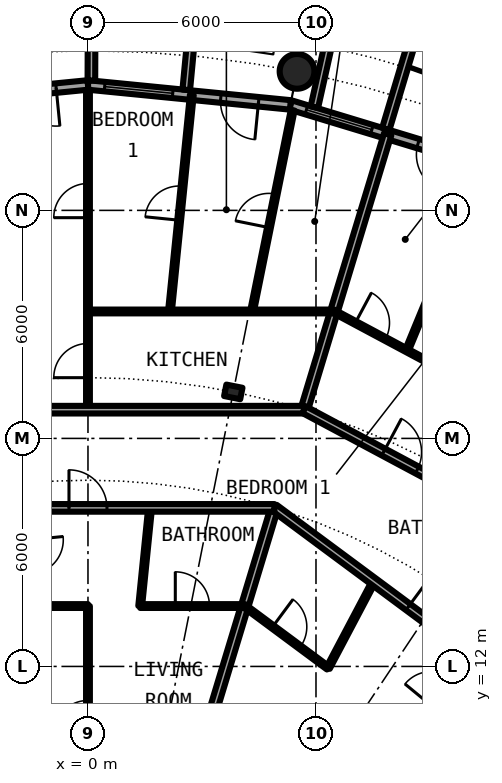
"""IFC4 building model, lengths in metres.
Left out: names, types, materials, properties, quantities, classifications, styles, units other than length and angle.
Written with IfcOpenShell. Run it as: python <this file> out.ifc"""

import sys

from ifc_helpers import new_model, si_unit, direction, frame, frame_2d, origin, origin_2d, place, context, subcontext, project, spatial, rectangle, hollow_circle, i_section, extrude, element, fill, save


model = new_model("IFC4")
c1 = context("Model", 3, precision=1e-05, world=origin(), true_north=direction((0.0, 1.0)))
c2 = subcontext(c1, "Body", "Model", "MODEL_VIEW")
j1 = project(units=[si_unit("LENGTHUNIT", "METRE"), si_unit("PLANEANGLEUNIT", "RADIAN")], contexts=[c1])
p1 = place(None, origin())
s1 = spatial("IfcSite", under=j1, at=p1, CompositionType="ELEMENT")
p2 = place(p1, origin())
s2 = spatial("IfcBuilding", under=s1, at=p2, CompositionType="ELEMENT")
p3 = place(p2, frame((0.0, 0.0, 120.8)))
s3 = spatial("IfcBuildingStorey", under=s2, at=p3, CompositionType="ELEMENT", Elevation=120.8)
p4 = place(p3, frame((5.501, 27.658, 0.0), z_axis=(0.0, 0.0, 1.0), x_axis=(1.0, 0.0, 0.0)))
e1 = element("IfcColumn", 1, at=p4, inside=s3, PredefinedType="COLUMN", context=c2, shape_type="SweptSolid", body=[
    extrude(hollow_circle(Radius=0.457, WallThickness=0.04, at=origin_2d()), origin(), (0.0, 0.0, 1.0), 3.05),
])
p5 = place(p3, frame((3.824, 19.223, 0.0), z_axis=(0.0, 0.0, 1.0), x_axis=(0.195090322016, 0.980785280403, 0.0)))
e2 = element("IfcColumn", 2, at=p5, inside=s3, PredefinedType="COLUMN", context=c2, shape_type="SweptSolid", body=[
    extrude(i_section(OverallWidth=0.307, OverallDepth=0.432, WebThickness=0.021, FlangeThickness=0.04, FilletRadius=0.027, at=origin_2d()), origin(), (0.0, 0.0, 1.0), 3.05),
])
p6 = place(p3, frame((10.447, 25.222, 0.0), z_axis=(0.0, 0.0, 1.0), x_axis=(-0.956965678721, 0.290201119486, 0.0)))
e3 = element("IfcWall", 3, at=p6, inside=s3, PredefinedType="SOLIDWALL", context=c2, shape_type="SweptSolid", body=[
    extrude(rectangle(XDim=5.351, YDim=0.25, at=frame_2d((2.676, 0.0))), origin(), (0.0, 0.0, 1.0), 2.7),
])
p7 = place(p6, frame((0.841, 0.0, 0.0)))
e4 = element("IfcOpeningElement", 4, at=p7, cuts=e3, PredefinedType="OPENING", context=c2, shape_type="SweptSolid", body=[
    extrude(rectangle(XDim=1.0, YDim=2.2, at=frame_2d((0.5, 1.1))), frame((0.0, 0.135, 0.0), z_axis=(0.0, -1.0, 0.0), x_axis=(1.0, 0.0, 0.0)), (0.0, 0.0, 1.0), 0.27),
])
p8 = place(p6, frame((3.111, 0.0, 0.3)))
e5 = element("IfcOpeningElement", 5, at=p8, cuts=e3, PredefinedType="OPENING", context=c2, shape_type="SweptSolid", body=[
    extrude(rectangle(XDim=1.8, YDim=2.1, at=frame_2d((0.9, 1.05))), frame((0.0, 0.135, 0.0), z_axis=(0.0, -1.0, 0.0), x_axis=(1.0, 0.0, 0.0)), (0.0, 0.0, 1.0), 0.27),
])
p9 = place(p3, frame((7.837, 26.144, -0.03), z_axis=(0.0, 0.0, 1.0), x_axis=(0.287064767992, 0.957911174889, 0.0)))
e6 = element("IfcWall", 6, at=p9, inside=s3, PredefinedType="SOLIDWALL", context=c2, shape_type="SweptSolid", body=[
    extrude(rectangle(XDim=3.006, YDim=0.2, at=frame_2d((1.503, 0.0))), origin(), (0.0, 0.0, 1.0), 2.73),
])
p10 = place(p3, frame((5.957, 26.715, -0.03), z_axis=(0.0, 0.0, 1.0), x_axis=(0.217857287091, 0.975980636315, 0.0)))
e7 = element("IfcWall", 7, at=p10, inside=s3, PredefinedType="SOLIDWALL", context=c2, shape_type="SweptSolid", body=[
    extrude(rectangle(XDim=2.928, YDim=0.2, at=frame_2d((1.464, 0.0))), origin(), (0.0, 0.0, 1.0), 2.73),
])
p11 = place(p3, frame((5.326, 26.775, 0.0), z_axis=(0.0, 0.0, 1.0), x_axis=(-0.995173996315, 0.098126026407, 0.0)))
e8 = element("IfcWall", 8, at=p11, inside=s3, PredefinedType="SOLIDWALL", context=c2, shape_type="SweptSolid", body=[
    extrude(rectangle(XDim=5.352, YDim=0.25, at=frame_2d((2.676, 0.0))), origin(), (0.0, 0.0, 1.0), 2.7),
])
p12 = place(p11, frame((0.841, 0.0, 0.0)))
e9 = element("IfcOpeningElement", 9, at=p12, cuts=e8, PredefinedType="OPENING", context=c2, shape_type="SweptSolid", body=[
    extrude(rectangle(XDim=1.0, YDim=2.2, at=frame_2d((0.5, 1.1))), frame((0.0, 0.135, 0.0), z_axis=(0.0, -1.0, 0.0), x_axis=(1.0, 0.0, 0.0)), (0.0, 0.0, 1.0), 0.27),
])
p13 = place(p11, frame((3.111, 0.0, 0.3)))
e10 = element("IfcOpeningElement", 10, at=p13, cuts=e8, PredefinedType="OPENING", context=c2, shape_type="SweptSolid", body=[
    extrude(rectangle(XDim=1.8, YDim=2.1, at=frame_2d((0.9, 1.05))), frame((0.0, 0.135, 0.0), z_axis=(0.0, -1.0, 0.0), x_axis=(1.0, 0.0, 0.0)), (0.0, 0.0, 1.0), 0.27),
])
p14 = place(p3, frame((2.586, 27.171, -0.03), z_axis=(0.0, 0.0, 1.0), x_axis=(0.094548432284, 0.995520262954, 0.0)))
e11 = element("IfcWall", 11, at=p14, inside=s3, PredefinedType="SOLIDWALL", context=c2, shape_type="SweptSolid", body=[
    extrude(rectangle(XDim=3.006, YDim=0.2, at=frame_2d((1.503, 0.0))), origin(), (0.0, 0.0, 1.0), 2.73),
])
p15 = place(p3, frame((0.09, 27.417, -0.03), z_axis=(0.0, 0.0, 1.0), x_axis=(0.00347308367, 0.999993968827, 0.0)))
e12 = element("IfcWall", 12, at=p15, inside=s3, PredefinedType="SOLIDWALL", context=c2, shape_type="SweptSolid", body=[
    extrude(rectangle(XDim=2.882, YDim=0.2, at=frame_2d((1.441, 0.0))), origin(), (0.0, 0.0, 1.0), 2.73),
])
p16 = place(p3, frame((0.0, 27.3, 0.0), z_axis=(0.0, 0.0, 1.0), x_axis=(-0.995173996315, -0.098126026407, 0.0)))
e13 = element("IfcWall", 13, at=p16, inside=s3, PredefinedType="SOLIDWALL", context=c2, shape_type="SweptSolid", body=[
    extrude(rectangle(XDim=5.352, YDim=0.25, at=frame_2d((2.676, 0.0))), origin(), (0.0, 0.0, 1.0), 2.7),
])
p17 = place(p16, frame((0.841, 0.0, 0.0)))
e14 = element("IfcOpeningElement", 14, at=p17, cuts=e13, PredefinedType="OPENING", context=c2, shape_type="SweptSolid", body=[
    extrude(rectangle(XDim=1.0, YDim=2.2, at=frame_2d((0.5, 1.1))), frame((0.0, 0.135, 0.0), z_axis=(0.0, -1.0, 0.0), x_axis=(1.0, 0.0, 0.0)), (0.0, 0.0, 1.0), 0.27),
])
p18 = place(p16, frame((3.111, 0.0, 0.3)))
e15 = element("IfcOpeningElement", 15, at=p18, cuts=e13, PredefinedType="OPENING", context=c2, shape_type="SweptSolid", body=[
    extrude(rectangle(XDim=1.8, YDim=2.1, at=frame_2d((0.9, 1.05))), frame((0.0, 0.135, 0.0), z_axis=(0.0, -1.0, 0.0), x_axis=(1.0, 0.0, 0.0)), (0.0, 0.0, 1.0), 0.27),
])
p19 = place(p3, frame((2.245, 7.387, 0.0), z_axis=(0.0, 0.0, 1.0), x_axis=(0.289977130626, 0.957033575019, 0.0)))
e16 = element("IfcWall", 16, at=p19, inside=s3, PredefinedType="PARTITIONING", context=c2, shape_type="SweptSolid", body=[
    extrude(rectangle(XDim=9.18, YDim=0.2, at=frame_2d((4.59, 0.0))), origin(), (0.0, 0.0, 1.0), 2.7),
])
p20 = place(p3, frame((5.69, 18.756, 0.0), z_axis=(0.0, 0.0, 1.0), x_axis=(0.29005838641, 0.957008951094, 0.0)))
e17 = element("IfcWall", 17, at=p20, inside=s3, PredefinedType="PARTITIONING", context=c2, shape_type="SweptSolid", body=[
    extrude(rectangle(XDim=7.574, YDim=0.2, at=frame_2d((3.787, 0.0))), origin(), (0.0, 0.0, 1.0), 2.7),
])
p21 = place(p3, frame((0.0, 7.72, 0.0), z_axis=(0.0, 0.0, 1.0), x_axis=(0.0, 1.0, 0.0)))
e18 = element("IfcWall", 18, at=p21, inside=s3, PredefinedType="PARTITIONING", context=c2, shape_type="SweptSolid", body=[
    extrude(rectangle(XDim=5.869, YDim=0.1, at=frame_2d((2.935, 0.0))), origin(), (0.0, 0.0, 1.0), 2.7),
])
p22 = place(p21, frame((2.485, 0.0, 0.0)))
e19 = element("IfcOpeningElement", 19, at=p22, cuts=e18, PredefinedType="OPENING", context=c2, shape_type="SweptSolid", body=[
    extrude(rectangle(XDim=0.9, YDim=2.3, at=frame_2d((0.45, 1.15))), frame((0.0, 0.06, 0.0), z_axis=(0.0, -1.0, 0.0), x_axis=(1.0, 0.0, 0.0)), (0.0, 0.0, 1.0), 0.12),
])
p23 = place(p3, frame((0.0, 18.756, 0.0), z_axis=(0.0, 0.0, 1.0), x_axis=(0.0, 1.0, 0.0)))
e20 = element("IfcWall", 20, at=p23, inside=s3, PredefinedType="PARTITIONING", context=c2, shape_type="SweptSolid", body=[
    extrude(rectangle(XDim=8.419, YDim=0.1, at=frame_2d((4.209, 0.0))), origin(), (0.0, 0.0, 1.0), 2.7),
])
p24 = place(p23, frame((0.842, 0.0, 0.0)))
e21 = element("IfcOpeningElement", 21, at=p24, cuts=e20, PredefinedType="OPENING", context=c2, shape_type="SweptSolid", body=[
    extrude(rectangle(XDim=0.9, YDim=2.3, at=frame_2d((0.45, 1.15))), frame((0.0, 0.06, 0.0), z_axis=(0.0, -1.0, 0.0), x_axis=(1.0, 0.0, 0.0)), (0.0, 0.0, 1.0), 0.12),
])
p25 = place(p23, frame((5.052, 0.0, 0.0)))
e22 = element("IfcOpeningElement", 22, at=p25, cuts=e20, PredefinedType="OPENING", context=c2, shape_type="SweptSolid", body=[
    extrude(rectangle(XDim=0.9, YDim=2.3, at=frame_2d((0.45, 1.15))), frame((0.0, 0.06, 0.0), z_axis=(0.0, -1.0, 0.0), x_axis=(1.0, 0.0, 0.0)), (0.0, 0.0, 1.0), 0.12),
])
p26 = place(p3, frame((1.374, 13.589, 0.0), z_axis=(0.0, 0.0, 1.0), x_axis=(0.100527855112, 0.994934244233, 0.0)))
e23 = element("IfcWall", 23, at=p26, inside=s3, PredefinedType="PARTITIONING", context=c2, shape_type="SweptSolid", body=[
    extrude(rectangle(XDim=2.596, YDim=0.1, at=frame_2d((1.298, 0.0))), origin(), (0.0, 0.0, 1.0), 2.7),
])
p27 = place(p3, frame((2.157, 21.34, 0.0), z_axis=(0.0, 0.0, 1.0), x_axis=(0.100580133625, 0.99492896064, 0.0)))
e24 = element("IfcWall", 24, at=p27, inside=s3, PredefinedType="PARTITIONING", context=c2, shape_type="SweptSolid", body=[
    extrude(rectangle(XDim=5.726, YDim=0.1, at=frame_2d((2.863, 0.0))), origin(), (0.0, 0.0, 1.0), 2.7),
])
p28 = place(p27, frame((2.413, 0.0, 0.0)))
e25 = element("IfcOpeningElement", 25, at=p28, cuts=e24, PredefinedType="OPENING", context=c2, shape_type="SweptSolid", body=[
    extrude(rectangle(XDim=0.9, YDim=2.3, at=frame_2d((0.45, 1.15))), frame((0.0, 0.06, 0.0), z_axis=(0.0, -1.0, 0.0), x_axis=(1.0, 0.0, 0.0)), (0.0, 0.0, 1.0), 0.12),
])
p29 = place(p3, frame((4.316, 21.34, 0.0), z_axis=(0.0, 0.0, 1.0), x_axis=(0.198227216881, 0.98015609496, 0.0)))
e26 = element("IfcWall", 26, at=p29, inside=s3, PredefinedType="PARTITIONING", context=c2, shape_type="SweptSolid", body=[
    extrude(rectangle(XDim=5.403, YDim=0.1, at=frame_2d((2.702, 0.0))), origin(), (0.0, 0.0, 1.0), 2.7),
])
p30 = place(p29, frame((2.252, 0.0, 0.0)))
e27 = element("IfcOpeningElement", 27, at=p30, cuts=e26, PredefinedType="OPENING", context=c2, shape_type="SweptSolid", body=[
    extrude(rectangle(XDim=0.9, YDim=2.3, at=frame_2d((0.45, 1.15))), frame((0.0, 0.06, 0.0), z_axis=(0.0, -1.0, 0.0), x_axis=(1.0, 0.0, 0.0)), (0.0, 0.0, 1.0), 0.12),
])
p31 = place(p3, frame((4.909, 5.958, 0.0), z_axis=(0.0, 0.0, 1.0), x_axis=(0.635976043025, 0.771708800454, 0.0)))
e28 = element("IfcWall", 28, at=p31, inside=s3, PredefinedType="PARTITIONING", context=c2, shape_type="SweptSolid", body=[
    extrude(rectangle(XDim=8.213, YDim=0.1, at=frame_2d((4.106, 0.0))), origin(), (0.0, 0.0, 1.0), 2.7),
])
p32 = place(p31, frame((6.49, 0.0, 0.0)))
e29 = element("IfcOpeningElement", 29, at=p32, cuts=e28, PredefinedType="OPENING", context=c2, shape_type="SweptSolid", body=[
    extrude(rectangle(XDim=0.9, YDim=2.3, at=frame_2d((0.45, 1.15))), frame((0.0, 0.06, 0.0), z_axis=(0.0, -1.0, 0.0), x_axis=(1.0, 0.0, 0.0)), (0.0, 0.0, 1.0), 0.12),
])
p33 = place(p31, frame((2.384, 0.0, 0.0)))
e30 = element("IfcOpeningElement", 30, at=p33, cuts=e28, PredefinedType="OPENING", context=c2, shape_type="SweptSolid", body=[
    extrude(rectangle(XDim=0.9, YDim=2.3, at=frame_2d((0.45, 1.15))), frame((0.0, 0.06, 0.0), z_axis=(0.0, -1.0, 0.0), x_axis=(1.0, 0.0, 0.0)), (0.0, 0.0, 1.0), 0.12),
])
p34 = place(p3, frame((6.318, 11.96, 0.0), z_axis=(0.0, 0.0, 1.0), x_axis=(0.467001992543, 0.884256263173, 0.0)))
e31 = element("IfcWall", 31, at=p34, inside=s3, PredefinedType="PARTITIONING", context=c2, shape_type="SweptSolid", body=[
    extrude(rectangle(XDim=2.572, YDim=0.1, at=frame_2d((1.286, 0.0))), origin(), (0.0, 0.0, 1.0), 2.7),
])
p35 = place(p3, frame((8.392, 20.314, 0.0), z_axis=(0.0, 0.0, 1.0), x_axis=(0.381673756215, 0.924297107978, 0.0)))
e32 = element("IfcWall", 32, at=p35, inside=s3, PredefinedType="PARTITIONING", context=c2, shape_type="SweptSolid", body=[
    extrude(rectangle(XDim=5.195, YDim=0.1, at=frame_2d((2.598, 0.0))), origin(), (0.0, 0.0, 1.0), 2.7),
])
p36 = place(p3, frame((4.122, 13.589, 0.0), z_axis=(0.0, 0.0, 1.0), x_axis=(0.803128348509, -0.595806055542, 0.0)))
e33 = element("IfcWall", 33, at=p36, inside=s3, PredefinedType="PARTITIONING", context=c2, shape_type="SweptSolid", body=[
    extrude(rectangle(XDim=2.734, YDim=0.1, at=frame_2d((1.367, 0.0))), origin(), (0.0, 0.0, 1.0), 2.7),
])
p37 = place(p36, frame((0.917, 0.0, 0.0)))
e34 = element("IfcOpeningElement", 34, at=p37, cuts=e33, PredefinedType="OPENING", context=c2, shape_type="SweptSolid", body=[
    extrude(rectangle(XDim=0.9, YDim=2.3, at=frame_2d((0.45, 1.15))), frame((0.0, 0.06, 0.0), z_axis=(0.0, -1.0, 0.0), x_axis=(1.0, 0.0, 0.0)), (0.0, 0.0, 1.0), 0.12),
])
p38 = place(p3, frame((-4.122, 13.589, 0.0), z_axis=(0.0, 0.0, 1.0), x_axis=(1.0, 0.0, 0.0)))
e35 = element("IfcWall", 35, at=p38, inside=s3, PredefinedType="PARTITIONING", context=c2, shape_type="SweptSolid", body=[
    extrude(rectangle(XDim=4.122, YDim=0.1, at=frame_2d((2.061, 0.0))), origin(), (0.0, 0.0, 1.0), 2.7),
])
p39 = place(p3, frame((1.374, 13.589, 0.0), z_axis=(0.0, 0.0, 1.0), x_axis=(1.0, 0.0, 0.0)))
e36 = element("IfcWall", 36, at=p39, inside=s3, PredefinedType="PARTITIONING", context=c2, shape_type="SweptSolid", body=[
    extrude(rectangle(XDim=2.748, YDim=0.1, at=frame_2d((1.374, 0.0))), origin(), (0.0, 0.0, 1.0), 2.7),
])
p40 = place(p39, frame((0.924, 0.0, 0.0)))
e37 = element("IfcOpeningElement", 37, at=p40, cuts=e36, PredefinedType="OPENING", context=c2, shape_type="SweptSolid", body=[
    extrude(rectangle(XDim=0.9, YDim=2.3, at=frame_2d((0.45, 1.15))), frame((0.0, 0.06, 0.0), z_axis=(0.0, -1.0, 0.0), x_axis=(1.0, 0.0, 0.0)), (0.0, 0.0, 1.0), 0.12),
])
p41 = place(p3, frame((4.906, 16.172, 0.0), z_axis=(0.0, 0.0, 1.0), x_axis=(0.803204584823, -0.59570327758, 0.0)))
e38 = element("IfcWall", 38, at=p41, inside=s3, PredefinedType="PARTITIONING", context=c2, shape_type="SweptSolid", body=[
    extrude(rectangle(XDim=11.387, YDim=0.2, at=frame_2d((5.693, 0.0))), origin(), (0.0, 0.0, 1.0), 2.7),
])
p42 = place(p41, frame((4.38, 0.0, 0.0)))
e39 = element("IfcOpeningElement", 39, at=p42, cuts=e38, PredefinedType="OPENING", context=c2, shape_type="SweptSolid", body=[
    extrude(rectangle(XDim=1.0, YDim=2.3, at=frame_2d((0.5, 1.15))), frame((0.0, 0.11, 0.0), z_axis=(0.0, -1.0, 0.0), x_axis=(1.0, 0.0, 0.0)), (0.0, 0.0, 1.0), 0.22),
])
p43 = place(p3, frame((-4.906, 16.172, 0.0), z_axis=(0.0, 0.0, 1.0), x_axis=(1.0, 0.0, 0.0)))
e40 = element("IfcWall", 40, at=p43, inside=s3, PredefinedType="PARTITIONING", context=c2, shape_type="SweptSolid", body=[
    extrude(rectangle(XDim=9.812, YDim=0.2, at=frame_2d((4.906, 0.0))), origin(), (0.0, 0.0, 1.0), 2.7),
])
p44 = place(p43, frame((4.406, 0.0, 0.0)))
e41 = element("IfcOpeningElement", 41, at=p44, cuts=e40, PredefinedType="OPENING", context=c2, shape_type="SweptSolid", body=[
    extrude(rectangle(XDim=1.0, YDim=2.3, at=frame_2d((0.5, 1.15))), frame((0.0, 0.11, 0.0), z_axis=(0.0, -1.0, 0.0), x_axis=(1.0, 0.0, 0.0)), (0.0, 0.0, 1.0), 0.22),
])
p45 = place(p3, frame((-5.69, 18.756, 0.0), z_axis=(0.0, 0.0, 1.0), x_axis=(1.0, 0.0, 0.0)))
e42 = element("IfcWall", 42, at=p45, inside=s3, PredefinedType="PARTITIONING", context=c2, shape_type="SweptSolid", body=[
    extrude(rectangle(XDim=11.38, YDim=0.2, at=frame_2d((5.69, 0.0))), origin(), (0.0, 0.0, 1.0), 2.7),
])
p46 = place(p45, frame((3.294, 0.0, 0.0)))
e43 = element("IfcOpeningElement", 43, at=p46, cuts=e42, PredefinedType="OPENING", context=c2, shape_type="SweptSolid", body=[
    extrude(rectangle(XDim=1.0, YDim=2.3, at=frame_2d((0.5, 1.15))), frame((0.0, 0.11, 0.0), z_axis=(0.0, -1.0, 0.0), x_axis=(1.0, 0.0, 0.0)), (0.0, 0.0, 1.0), 0.22),
])
p47 = place(p3, frame((5.687, 18.757, 0.0), z_axis=(0.0, 0.0, 1.0), x_axis=(0.8819312112, -0.471378127104, 0.0)))
e44 = element("IfcWall", 44, at=p47, inside=s3, PredefinedType="PARTITIONING", context=c2, shape_type="SweptSolid", body=[
    extrude(rectangle(XDim=7.65, YDim=0.2, at=frame_2d((3.825, 0.0))), origin(), (0.0, 0.0, 1.0), 2.39),
])
p48 = place(p47, frame((2.371, 0.0, 0.0)))
e45 = element("IfcOpeningElement", 45, at=p48, cuts=e44, PredefinedType="OPENING", context=c2, shape_type="SweptSolid", body=[
    extrude(rectangle(XDim=1.0, YDim=2.3, at=frame_2d((0.5, 1.15))), frame((0.0, 0.11, 0.0), z_axis=(0.0, -1.0, 0.0), x_axis=(1.0, 0.0, 0.0)), (0.0, 0.0, 1.0), 0.22),
])
p49 = place(p3, frame((0.0, 21.34, 0.0), z_axis=(0.0, 0.0, 1.0), x_axis=(1.0, 0.0, 0.0)))
e46 = element("IfcWall", 46, at=p49, inside=s3, PredefinedType="PARTITIONING", context=c2, shape_type="SweptSolid", body=[
    extrude(rectangle(XDim=6.473, YDim=0.1, at=frame_2d((3.236, 0.0))), origin(), (0.0, 0.0, 1.0), 2.7),
])
p50 = place(p3, frame((6.471, 21.341, 0.0), z_axis=(0.0, 0.0, 1.0), x_axis=(0.881932070463, -0.471376519451, 0.0)))
e47 = element("IfcWall", 47, at=p50, inside=s3, PredefinedType="PARTITIONING", context=c2, shape_type="SweptSolid", body=[
    extrude(rectangle(XDim=4.355, YDim=0.1, at=frame_2d((2.178, 0.0))), origin(), (0.0, 0.0, 1.0), 2.7),
])
p51 = place(p50, frame((0.639, 0.0, 0.0)))
e48 = element("IfcOpeningElement", 48, at=p51, cuts=e47, PredefinedType="OPENING", context=c2, shape_type="SweptSolid", body=[
    extrude(rectangle(XDim=0.9, YDim=2.3, at=frame_2d((0.45, 1.15))), frame((0.0, 0.06, 0.0), z_axis=(0.0, -1.0, 0.0), x_axis=(1.0, 0.0, 0.0)), (0.0, 0.0, 1.0), 0.12),
])
p52 = place(p7, origin())
e49 = element("IfcDoor", 49, at=p52, inside=s3, OperationType="SINGLE_SWING_LEFT", PredefinedType="DOOR", context=c2, shape_type="SweptSolid", body=[
    extrude(rectangle(XDim=1.0, YDim=2.2, at=frame_2d((0.5, 1.1))), frame((0.0, 0.025, 0.0), z_axis=(0.0, -1.0, 0.0), x_axis=(1.0, 0.0, 0.0)), (0.0, 0.0, 1.0), 0.05),
])
fill(e4, e49)
p53 = place(p8, origin())
e50 = element("IfcWindow", 50, at=p53, inside=s3, PartitioningType="SINGLE_PANEL", PredefinedType="WINDOW", context=c2, shape_type="SweptSolid", body=[
    extrude(rectangle(XDim=1.8, YDim=2.1, at=frame_2d((0.9, 1.05))), frame((0.0, 0.03, 0.0), z_axis=(0.0, -1.0, 0.0), x_axis=(1.0, 0.0, 0.0)), (0.0, 0.0, 1.0), 0.06),
])
fill(e5, e50)
p54 = place(p12, origin())
e51 = element("IfcDoor", 51, at=p54, inside=s3, OperationType="SINGLE_SWING_LEFT", PredefinedType="DOOR", context=c2, shape_type="SweptSolid", body=[
    extrude(rectangle(XDim=1.0, YDim=2.2, at=frame_2d((0.5, 1.1))), frame((0.0, 0.025, 0.0), z_axis=(0.0, -1.0, 0.0), x_axis=(1.0, 0.0, 0.0)), (0.0, 0.0, 1.0), 0.05),
])
fill(e9, e51)
p55 = place(p13, origin())
e52 = element("IfcWindow", 52, at=p55, inside=s3, PartitioningType="SINGLE_PANEL", PredefinedType="WINDOW", context=c2, shape_type="SweptSolid", body=[
    extrude(rectangle(XDim=1.8, YDim=2.1, at=frame_2d((0.9, 1.05))), frame((0.0, 0.03, 0.0), z_axis=(0.0, -1.0, 0.0), x_axis=(1.0, 0.0, 0.0)), (0.0, 0.0, 1.0), 0.06),
])
fill(e10, e52)
p56 = place(p17, origin())
e53 = element("IfcDoor", 53, at=p56, inside=s3, OperationType="SINGLE_SWING_LEFT", PredefinedType="DOOR", context=c2, shape_type="SweptSolid", body=[
    extrude(rectangle(XDim=1.0, YDim=2.2, at=frame_2d((0.5, 1.1))), frame((0.0, 0.025, 0.0), z_axis=(0.0, -1.0, 0.0), x_axis=(1.0, 0.0, 0.0)), (0.0, 0.0, 1.0), 0.05),
])
fill(e14, e53)
p57 = place(p48, origin())
e54 = element("IfcDoor", 54, at=p57, inside=s3, OperationType="SINGLE_SWING_LEFT", PredefinedType="DOOR", context=c2, shape_type="SweptSolid", body=[
    extrude(rectangle(XDim=1.0, YDim=2.3, at=frame_2d((0.5, 1.15))), frame((0.0, 0.025, 0.0), z_axis=(0.0, -1.0, 0.0), x_axis=(1.0, 0.0, 0.0)), (0.0, 0.0, 1.0), 0.05),
])
fill(e45, e54)
p58 = place(p51, origin())
e55 = element("IfcDoor", 55, at=p58, inside=s3, OperationType="SINGLE_SWING_LEFT", PredefinedType="DOOR", context=c2, shape_type="SweptSolid", body=[
    extrude(rectangle(XDim=0.9, YDim=2.3, at=frame_2d((0.45, 1.15))), frame((0.0, 0.025, 0.0), z_axis=(0.0, -1.0, 0.0), x_axis=(1.0, 0.0, 0.0)), (0.0, 0.0, 1.0), 0.05),
])
fill(e48, e55)
p59 = place(p24, origin())
e56 = element("IfcDoor", 56, at=p59, inside=s3, OperationType="SINGLE_SWING_LEFT", PredefinedType="DOOR", context=c2, shape_type="SweptSolid", body=[
    extrude(rectangle(XDim=0.9, YDim=2.3, at=frame_2d((0.45, 1.15))), frame((0.0, 0.025, 0.0), z_axis=(0.0, -1.0, 0.0), x_axis=(1.0, 0.0, 0.0)), (0.0, 0.0, 1.0), 0.05),
])
fill(e21, e56)
p60 = place(p25, origin())
e57 = element("IfcDoor", 57, at=p60, inside=s3, OperationType="SINGLE_SWING_RIGHT", PredefinedType="DOOR", context=c2, shape_type="SweptSolid", body=[
    extrude(rectangle(XDim=0.9, YDim=2.3, at=frame_2d((0.45, 1.15))), frame((0.0, 0.025, 0.0), z_axis=(0.0, -1.0, 0.0), x_axis=(1.0, 0.0, 0.0)), (0.0, 0.0, 1.0), 0.05),
])
fill(e22, e57)
p61 = place(p28, origin())
e58 = element("IfcDoor", 58, at=p61, inside=s3, OperationType="SINGLE_SWING_RIGHT", PredefinedType="DOOR", context=c2, shape_type="SweptSolid", body=[
    extrude(rectangle(XDim=0.9, YDim=2.3, at=frame_2d((0.45, 1.15))), frame((0.0, 0.025, 0.0), z_axis=(0.0, -1.0, 0.0), x_axis=(1.0, 0.0, 0.0)), (0.0, 0.0, 1.0), 0.05),
])
fill(e25, e58)
p62 = place(p30, origin())
e59 = element("IfcDoor", 59, at=p62, inside=s3, OperationType="SINGLE_SWING_RIGHT", PredefinedType="DOOR", context=c2, shape_type="SweptSolid", body=[
    extrude(rectangle(XDim=0.9, YDim=2.3, at=frame_2d((0.45, 1.15))), frame((0.0, 0.025, 0.0), z_axis=(0.0, -1.0, 0.0), x_axis=(1.0, 0.0, 0.0)), (0.0, 0.0, 1.0), 0.05),
])
fill(e27, e59)
p63 = place(p42, origin())
e60 = element("IfcDoor", 60, at=p63, inside=s3, OperationType="SINGLE_SWING_LEFT", PredefinedType="DOOR", context=c2, shape_type="SweptSolid", body=[
    extrude(rectangle(XDim=1.0, YDim=2.3, at=frame_2d((0.5, 1.15))), frame((0.0, 0.025, 0.0), z_axis=(0.0, -1.0, 0.0), x_axis=(1.0, 0.0, 0.0)), (0.0, 0.0, 1.0), 0.05),
])
fill(e39, e60)
p64 = place(p37, origin())
e61 = element("IfcDoor", 61, at=p64, inside=s3, OperationType="SINGLE_SWING_LEFT", PredefinedType="DOOR", context=c2, shape_type="SweptSolid", body=[
    extrude(rectangle(XDim=0.9, YDim=2.3, at=frame_2d((0.45, 1.15))), frame((0.0, 0.025, 0.0), z_axis=(0.0, -1.0, 0.0), x_axis=(1.0, 0.0, 0.0)), (0.0, 0.0, 1.0), 0.05),
])
fill(e34, e61)
p65 = place(p44, origin())
e62 = element("IfcDoor", 62, at=p65, inside=s3, OperationType="SINGLE_SWING_LEFT", PredefinedType="DOOR", context=c2, shape_type="SweptSolid", body=[
    extrude(rectangle(XDim=1.0, YDim=2.3, at=frame_2d((0.5, 1.15))), frame((0.0, 0.025, 0.0), z_axis=(0.0, -1.0, 0.0), x_axis=(1.0, 0.0, 0.0)), (0.0, 0.0, 1.0), 0.05),
])
fill(e41, e62)
p66 = place(p40, origin())
e63 = element("IfcDoor", 63, at=p66, inside=s3, OperationType="SINGLE_SWING_RIGHT", PredefinedType="DOOR", context=c2, shape_type="SweptSolid", body=[
    extrude(rectangle(XDim=0.9, YDim=2.3, at=frame_2d((0.45, 1.15))), frame((0.0, 0.025, 0.0), z_axis=(0.0, -1.0, 0.0), x_axis=(1.0, 0.0, 0.0)), (0.0, 0.0, 1.0), 0.05),
])
fill(e37, e63)
p67 = place(p22, origin())
e64 = element("IfcDoor", 64, at=p67, inside=s3, OperationType="SINGLE_SWING_RIGHT", PredefinedType="DOOR", context=c2, shape_type="SweptSolid", body=[
    extrude(rectangle(XDim=0.9, YDim=2.3, at=frame_2d((0.45, 1.15))), frame((0.0, 0.025, 0.0), z_axis=(0.0, -1.0, 0.0), x_axis=(1.0, 0.0, 0.0)), (0.0, 0.0, 1.0), 0.05),
])
fill(e19, e64)
save(model, sys.argv[1])
